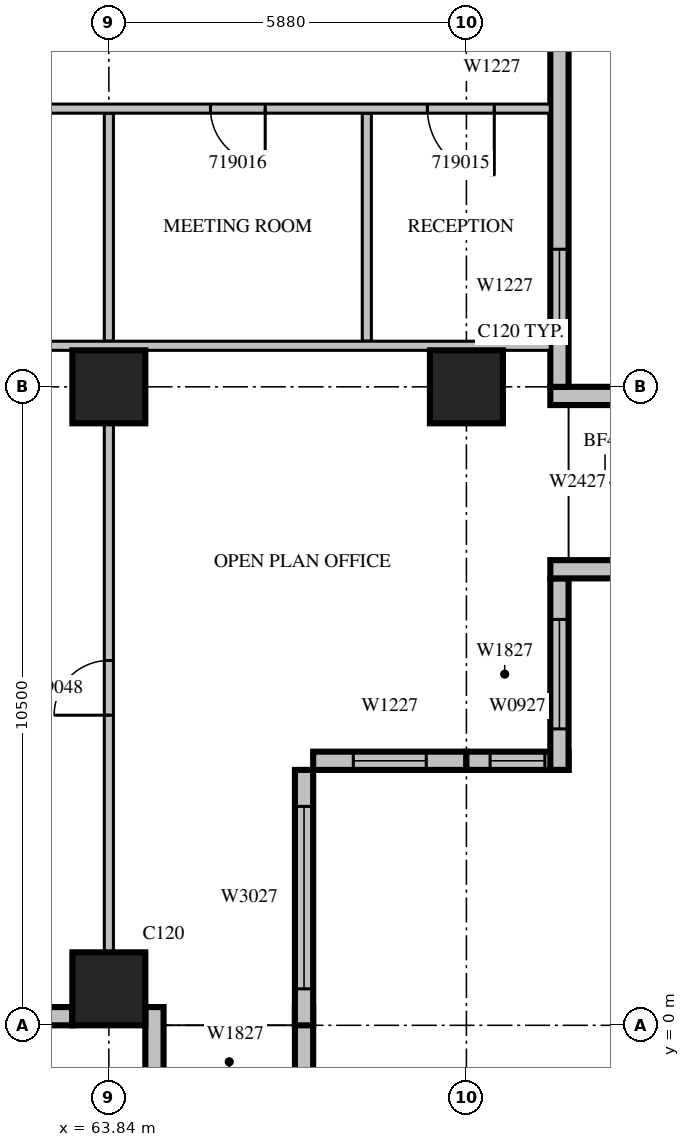
"""IFC4 building model, lengths in metres.
Left out: names, types, materials, properties, quantities, classifications, styles, units other than length and angle.
Written with IfcOpenShell. Run it as: python <this file> out.ifc"""

import sys

from ifc_helpers import new_model, si_unit, direction, frame, frame_2d, origin, origin_2d, place, context, subcontext, project, spatial, rectangle, extrude, source, transform, mapped, element, fill, save


model = new_model("IFC4")
c1 = context("Model", 3, precision=1e-05, world=origin(), true_north=direction((0.0, 1.0)))
c2 = subcontext(c1, "Body", "Model", "MODEL_VIEW")
j1 = project(units=[si_unit("LENGTHUNIT", "METRE"), si_unit("PLANEANGLEUNIT", "RADIAN")], contexts=[c1])
p1 = place(None, origin())
s1 = spatial("IfcSite", under=j1, at=p1, CompositionType="ELEMENT")
p2 = place(p1, origin())
s2 = spatial("IfcBuilding", under=s1, at=p2, CompositionType="ELEMENT")
p3 = place(p2, frame((0.0, 0.0, 90.9)))
s3 = spatial("IfcBuildingStorey", under=s2, at=p3, CompositionType="ELEMENT", Elevation=90.9)
m1 = source(origin(), c2, "Body", "SweptSolid", [
    extrude(rectangle(XDim=1.2, YDim=1.2, at=origin_2d()), origin(), (0.0, 0.0, 1.0), 4.2),
])
for number, where, z_axis, x_axis in (
    (1, (63.84, 0.6, 0.0), (0.0, 0.0, 1.0), (1.0, 0.0, 0.0)),
    (2, (63.84, 10.5, 0.0), (0.0, 0.0, 1.0), (1.0, 0.0, 0.0)),
    (3, (69.72, 10.5, 0.0), (0.0, 0.0, 1.0), (1.0, 0.0, 0.0)),
):
    element("IfcColumn", number, at=place(p3, frame(where, z_axis=z_axis, x_axis=x_axis)), inside=s3, PredefinedType="COLUMN", context=c2, shape_type="MappedRepresentation", body=[
        mapped(m1, transform((0.0, 0.0, 0.0), scale=1.0)),
    ])
m2 = source(origin(), c2, "Body", "SweptSolid", [
    extrude(rectangle(XDim=4.68, YDim=0.3, at=frame_2d((2.34, 0.0))), origin(), (0.0, 0.0, 1.0), 3.8),
])
p4 = place(p3, frame((58.56, 0.15, 0.0), z_axis=(0.0, 0.0, 1.0), x_axis=(1.0, 0.0, 0.0)))
e4 = element("IfcWall", 4, at=p4, inside=s3, PredefinedType="STANDARD", context=c2, shape_type="MappedRepresentation", body=[
    mapped(m2, transform((0.0, 0.0, 0.0), scale=1.0)),
])
m3 = source(origin(), c2, "Body", "SweptSolid", [
    extrude(rectangle(XDim=1.8, YDim=2.7, at=frame_2d((0.9, 1.35))), frame((0.0, 0.16, 0.0), z_axis=(0.0, -1.0, 0.0), x_axis=(1.0, 0.0, 0.0)), (0.0, 0.0, 1.0), 0.32),
])
p5 = place(p4, frame((0.877, 0.0, 0.6)))
e5 = element("IfcOpeningElement", 5, at=p5, cuts=e4, PredefinedType="OPENING", context=c2, shape_type="MappedRepresentation", body=[
    mapped(m3, transform((0.0, 0.0, 0.0), scale=1.0)),
])
m4 = source(origin(), c2, "Body", "SweptSolid", [
    extrude(rectangle(XDim=1.2, YDim=0.3, at=frame_2d((0.6, 0.0))), origin(), (0.0, 0.0, 1.0), 3.8),
])
for number, where, z_axis, x_axis in (
    (6, (64.59, 0.3, 0.0), (0.0, 0.0, 1.0), (0.0, -1.0, 0.0)),
    (7, (67.05, 0.3, 0.0), (0.0, 0.0, 1.0), (0.0, -1.0, 0.0)),
):
    element("IfcWall", number, at=place(p3, frame(where, z_axis=z_axis, x_axis=x_axis)), inside=s3, PredefinedType="STANDARD", context=c2, shape_type="MappedRepresentation", body=[
        mapped(m4, transform((0.0, 0.0, 0.0), scale=1.0)),
    ])
m5 = source(origin(), c2, "Body", "SweptSolid", [
    extrude(rectangle(XDim=4.2, YDim=0.3, at=frame_2d((2.1, 0.0))), origin(), (0.0, 0.0, 1.0), 3.8),
])
p6 = place(p3, frame((67.05, 0.0, 0.0), z_axis=(0.0, 0.0, 1.0), x_axis=(0.0, 1.0, 0.0)))
e8 = element("IfcWall", 8, at=p6, inside=s3, PredefinedType="STANDARD", context=c2, shape_type="MappedRepresentation", body=[
    mapped(m5, transform((0.0, 0.0, 0.0), scale=1.0)),
])
m6 = source(origin(), c2, "Body", "SweptSolid", [
    extrude(rectangle(XDim=3.0, YDim=2.7, at=frame_2d((1.5, 1.35))), frame((0.0, 0.16, 0.0), z_axis=(0.0, -1.0, 0.0), x_axis=(1.0, 0.0, 0.0)), (0.0, 0.0, 1.0), 0.32),
])
p7 = place(p6, frame((0.6, 0.0, 0.6)))
e9 = element("IfcOpeningElement", 9, at=p7, cuts=e8, PredefinedType="OPENING", context=c2, shape_type="MappedRepresentation", body=[
    mapped(m6, transform((0.0, 0.0, 0.0), scale=1.0)),
])
m7 = source(origin(), c2, "Body", "SweptSolid", [
    extrude(rectangle(XDim=2.52, YDim=0.3, at=frame_2d((1.26, 0.0))), origin(), (0.0, 0.0, 1.0), 3.8),
])
p8 = place(p3, frame((67.2, 4.35, 0.0), z_axis=(0.0, 0.0, 1.0), x_axis=(1.0, 0.0, 0.0)))
e10 = element("IfcWall", 10, at=p8, inside=s3, PredefinedType="STANDARD", context=c2, shape_type="MappedRepresentation", body=[
    mapped(m7, transform((0.0, 0.0, 0.0), scale=1.0)),
])
m8 = source(origin(), c2, "Body", "SweptSolid", [
    extrude(rectangle(XDim=1.2, YDim=2.7, at=frame_2d((0.6, 1.35))), frame((0.0, 0.16, 0.0), z_axis=(0.0, -1.0, 0.0), x_axis=(1.0, 0.0, 0.0)), (0.0, 0.0, 1.0), 0.32),
])
p9 = place(p8, frame((0.66, 0.0, 0.6)))
e11 = element("IfcOpeningElement", 11, at=p9, cuts=e10, PredefinedType="OPENING", context=c2, shape_type="MappedRepresentation", body=[
    mapped(m8, transform((0.0, 0.0, 0.0), scale=1.0)),
])
m9 = source(origin(), c2, "Body", "SweptSolid", [
    extrude(rectangle(XDim=1.68, YDim=0.3, at=frame_2d((0.84, 0.0))), origin(), (0.0, 0.0, 1.0), 3.8),
])
p10 = place(p3, frame((69.72, 4.35, 0.0), z_axis=(0.0, 0.0, 1.0), x_axis=(1.0, 0.0, 0.0)))
e12 = element("IfcWall", 12, at=p10, inside=s3, PredefinedType="STANDARD", context=c2, shape_type="MappedRepresentation", body=[
    mapped(m9, transform((0.0, 0.0, 0.0), scale=1.0)),
])
m10 = source(origin(), c2, "Body", "SweptSolid", [
    extrude(rectangle(XDim=0.9, YDim=2.7, at=frame_2d((0.45, 1.35))), frame((0.0, 0.16, 0.0), z_axis=(0.0, -1.0, 0.0), x_axis=(1.0, 0.0, 0.0)), (0.0, 0.0, 1.0), 0.32),
])
p11 = place(p10, frame((0.39, 0.0, 0.6)))
e13 = element("IfcOpeningElement", 13, at=p11, cuts=e12, PredefinedType="OPENING", context=c2, shape_type="MappedRepresentation", body=[
    mapped(m10, transform((0.0, 0.0, 0.0), scale=1.0)),
])
m11 = source(origin(), c2, "Body", "SweptSolid", [
    extrude(rectangle(XDim=3.15, YDim=0.3, at=frame_2d((1.575, 0.0))), origin(), (0.0, 0.0, 1.0), 3.8),
])
p12 = place(p3, frame((71.25, 4.2, 0.0), z_axis=(0.0, 0.0, 1.0), x_axis=(0.0, 1.0, 0.0)))
e14 = element("IfcWall", 14, at=p12, inside=s3, PredefinedType="STANDARD", context=c2, shape_type="MappedRepresentation", body=[
    mapped(m11, transform((0.0, 0.0, 0.0), scale=1.0)),
])
p13 = place(p12, frame((0.675, 0.0, 0.6)))
e15 = element("IfcOpeningElement", 15, at=p13, cuts=e14, PredefinedType="OPENING", context=c2, shape_type="MappedRepresentation", body=[
    mapped(m3, transform((0.0, 0.0, 0.0), scale=1.0)),
])
for number, where, z_axis, x_axis in (
    (16, (71.1, 7.5, 0.0), (0.0, 0.0, 1.0), (1.0, 0.0, 0.0)),
    (17, (71.1, 10.35, 0.0), (0.0, 0.0, 1.0), (1.0, 0.0, 0.0)),
):
    element("IfcWall", number, at=place(p3, frame(where, z_axis=z_axis, x_axis=x_axis)), inside=s3, PredefinedType="STANDARD", context=c2, shape_type="MappedRepresentation", body=[
        mapped(m4, transform((0.0, 0.0, 0.0), scale=1.0)),
    ])
m12 = source(origin(), c2, "Body", "SweptSolid", [
    extrude(rectangle(XDim=6.3, YDim=0.3, at=frame_2d((3.15, 0.0))), origin(), (0.0, 0.0, 1.0), 3.8),
])
p14 = place(p3, frame((71.25, 10.5, 0.0), z_axis=(0.0, 0.0, 1.0), x_axis=(0.0, 1.0, 0.0)))
e18 = element("IfcWall", 18, at=p14, inside=s3, PredefinedType="STANDARD", context=c2, shape_type="MappedRepresentation", body=[
    mapped(m12, transform((0.0, 0.0, 0.0), scale=1.0)),
])
p15 = place(p14, frame((1.062, 0.0, 0.6)))
e19 = element("IfcOpeningElement", 19, at=p15, cuts=e18, PredefinedType="OPENING", context=c2, shape_type="MappedRepresentation", body=[
    mapped(m8, transform((0.0, 0.0, 0.0), scale=1.0)),
])
m13 = source(origin(), c2, "Body", "SweptSolid", [
    extrude(rectangle(XDim=3.75, YDim=0.15, at=frame_2d((1.875, 0.0))), origin(), (0.0, 0.0, 1.0), 3.8),
])
p16 = place(p3, frame((68.082, 11.25, 0.0), z_axis=(0.0, 0.0, 1.0), x_axis=(0.0, 1.0, 0.0)))
e20 = element("IfcWall", 20, at=p16, inside=s3, PredefinedType="PARTITIONING", context=c2, shape_type="MappedRepresentation", body=[
    mapped(m13, transform((0.0, 0.0, 0.0), scale=1.0)),
])
m14 = source(origin(), c2, "Body", "SweptSolid", [
    extrude(rectangle(XDim=8.702, YDim=0.15, at=frame_2d((4.351, 0.0))), origin(), (0.0, 0.0, 1.0), 3.8),
])
p17 = place(p3, frame((63.84, 1.199, 0.0), z_axis=(0.0, 0.0, 1.0), x_axis=(0.0, 1.0, 0.0)))
e21 = element("IfcWall", 21, at=p17, inside=s3, PredefinedType="PARTITIONING", context=c2, shape_type="MappedRepresentation", body=[
    mapped(m14, transform((0.0, 0.0, 0.0), scale=1.0)),
])
m15 = source(origin(), c2, "Body", "SweptSolid", [
    extrude(rectangle(XDim=0.9, YDim=2.1, at=frame_2d((0.45, 1.05))), frame((0.0, 0.085, 0.0), z_axis=(0.0, -1.0, 0.0), x_axis=(1.0, 0.0, 0.0)), (0.0, 0.0, 1.0), 0.17),
])
p18 = place(p17, frame((3.901, 0.0, 0.0)))
e22 = element("IfcOpeningElement", 22, at=p18, cuts=e21, PredefinedType="OPENING", context=c2, shape_type="MappedRepresentation", body=[
    mapped(m15, transform((0.0, 0.0, 0.0), scale=1.0)),
])
p19 = place(p3, frame((63.84, 11.25, 0.0), z_axis=(0.0, 0.0, 1.0), x_axis=(0.0, 1.0, 0.0)))
e23 = element("IfcWall", 23, at=p19, inside=s3, PredefinedType="PARTITIONING", context=c2, shape_type="MappedRepresentation", body=[
    mapped(m13, transform((0.0, 0.0, 0.0), scale=1.0)),
])
m16 = source(origin(), c2, "Body", "SweptSolid", [
    extrude(rectangle(XDim=24.9, YDim=0.15, at=frame_2d((12.45, 0.0))), origin(), (0.0, 0.0, 1.0), 3.8),
])
p20 = place(p3, frame((71.1, 11.175, 0.0), z_axis=(0.0, 0.0, 1.0), x_axis=(-1.0, 0.0, 0.0)))
e24 = element("IfcWall", 24, at=p20, inside=s3, PredefinedType="PARTITIONING", context=c2, shape_type="MappedRepresentation", body=[
    mapped(m16, transform((0.0, 0.0, 0.0), scale=1.0)),
])
p21 = place(p20, frame((21.512, 0.0, 0.0)))
e25 = element("IfcOpeningElement", 25, at=p21, cuts=e24, PredefinedType="OPENING", context=c2, shape_type="MappedRepresentation", body=[
    mapped(m15, transform((0.0, 0.0, 0.0), scale=1.0)),
])
p22 = place(p20, frame((15.633, 0.0, 0.0)))
e26 = element("IfcOpeningElement", 26, at=p22, cuts=e24, PredefinedType="OPENING", context=c2, shape_type="MappedRepresentation", body=[
    mapped(m15, transform((0.0, 0.0, 0.0), scale=1.0)),
])
p23 = place(p20, frame((9.752, 0.0, 0.0)))
e27 = element("IfcOpeningElement", 27, at=p23, cuts=e24, PredefinedType="OPENING", context=c2, shape_type="MappedRepresentation", body=[
    mapped(m15, transform((0.0, 0.0, 0.0), scale=1.0)),
])
p24 = place(p3, frame((71.1, 15.075, 0.0), z_axis=(0.0, 0.0, 1.0), x_axis=(-1.0, 0.0, 0.0)))
e28 = element("IfcWall", 28, at=p24, inside=s3, PredefinedType="PARTITIONING", context=c2, shape_type="MappedRepresentation", body=[
    mapped(m16, transform((0.0, 0.0, 0.0), scale=1.0)),
])
m17 = source(origin(), c2, "Body", "SweptSolid", [
    extrude(rectangle(XDim=1.2, YDim=2.1, at=frame_2d((0.6, 1.05))), frame((0.0, 0.085, 0.0), z_axis=(0.0, -1.0, 0.0), x_axis=(1.0, 0.0, 0.0)), (0.0, 0.0, 1.0), 0.17),
])
p25 = place(p24, frame((15.48, 0.0, 0.0)))
e29 = element("IfcOpeningElement", 29, at=p25, cuts=e28, PredefinedType="OPENING", context=c2, shape_type="MappedRepresentation", body=[
    mapped(m17, transform((0.0, 0.0, 0.0), scale=1.0)),
])
m18 = source(origin(), c2, "Body", "SweptSolid", [
    extrude(rectangle(XDim=1.1, YDim=2.1, at=frame_2d((0.55, 1.05))), frame((0.0, 0.085, 0.0), z_axis=(0.0, -1.0, 0.0), x_axis=(1.0, 0.0, 0.0)), (0.0, 0.0, 1.0), 0.17),
])
p26 = place(p24, frame((0.921, 0.0, 0.0)))
e30 = element("IfcOpeningElement", 30, at=p26, cuts=e28, PredefinedType="OPENING", context=c2, shape_type="MappedRepresentation", body=[
    mapped(m18, transform((0.0, 0.0, 0.0), scale=1.0)),
])
p27 = place(p24, frame((4.689, 0.0, 0.0)))
e31 = element("IfcOpeningElement", 31, at=p27, cuts=e28, PredefinedType="OPENING", context=c2, shape_type="MappedRepresentation", body=[
    mapped(m15, transform((0.0, 0.0, 0.0), scale=1.0)),
])
m19 = source(origin(), c2, "Body", "SweptSolid", [
    extrude(rectangle(XDim=3.0, YDim=2.7, at=frame_2d((1.5, 1.35))), frame((0.0, 0.03, 0.0), z_axis=(0.0, -1.0, 0.0), x_axis=(1.0, 0.0, 0.0)), (0.0, 0.0, 1.0), 0.06),
])
p28 = place(p7, origin())
e32 = element("IfcWindow", 32, at=p28, inside=s3, PartitioningType="SINGLE_PANEL", PredefinedType="WINDOW", context=c2, shape_type="MappedRepresentation", body=[
    mapped(m19, transform((0.0, 0.0, 0.0), scale=1.0)),
])
fill(e9, e32)
m20 = source(origin(), c2, "Body", "SweptSolid", [
    extrude(rectangle(XDim=1.2, YDim=2.7, at=frame_2d((0.6, 1.35))), frame((0.0, 0.03, 0.0), z_axis=(0.0, -1.0, 0.0), x_axis=(1.0, 0.0, 0.0)), (0.0, 0.0, 1.0), 0.06),
])
p29 = place(p9, origin())
e33 = element("IfcWindow", 33, at=p29, inside=s3, PartitioningType="SINGLE_PANEL", PredefinedType="WINDOW", context=c2, shape_type="MappedRepresentation", body=[
    mapped(m20, transform((0.0, 0.0, 0.0), scale=1.0)),
])
fill(e11, e33)
m21 = source(origin(), c2, "Body", "SweptSolid", [
    extrude(rectangle(XDim=0.9, YDim=2.7, at=frame_2d((0.45, 1.35))), frame((0.0, 0.03, 0.0), z_axis=(0.0, -1.0, 0.0), x_axis=(1.0, 0.0, 0.0)), (0.0, 0.0, 1.0), 0.06),
])
p30 = place(p11, origin())
e34 = element("IfcWindow", 34, at=p30, inside=s3, PartitioningType="SINGLE_PANEL", PredefinedType="WINDOW", context=c2, shape_type="MappedRepresentation", body=[
    mapped(m21, transform((0.0, 0.0, 0.0), scale=1.0)),
])
fill(e13, e34)
m22 = source(origin(), c2, "Body", "SweptSolid", [
    extrude(rectangle(XDim=1.8, YDim=2.7, at=frame_2d((0.9, 1.35))), frame((0.0, 0.03, 0.0), z_axis=(0.0, -1.0, 0.0), x_axis=(1.0, 0.0, 0.0)), (0.0, 0.0, 1.0), 0.06),
])
p31 = place(p13, origin())
e35 = element("IfcWindow", 35, at=p31, inside=s3, PartitioningType="SINGLE_PANEL", PredefinedType="WINDOW", context=c2, shape_type="MappedRepresentation", body=[
    mapped(m22, transform((0.0, 0.0, 0.0), scale=1.0)),
])
fill(e15, e35)
p32 = place(p15, origin())
e36 = element("IfcWindow", 36, at=p32, inside=s3, PartitioningType="SINGLE_PANEL", PredefinedType="WINDOW", context=c2, shape_type="MappedRepresentation", body=[
    mapped(m20, transform((0.0, 0.0, 0.0), scale=1.0)),
])
fill(e19, e36)
m23 = source(origin(), c2, "Body", "SweptSolid", [
    extrude(rectangle(XDim=1.1, YDim=2.1, at=frame_2d((0.55, 1.05))), frame((0.0, 0.025, 0.0), z_axis=(0.0, -1.0, 0.0), x_axis=(1.0, 0.0, 0.0)), (0.0, 0.0, 1.0), 0.05),
])
p33 = place(p26, origin())
e37 = element("IfcDoor", 37, at=p33, inside=s3, OperationType="SINGLE_SWING_LEFT", PredefinedType="DOOR", context=c2, shape_type="MappedRepresentation", body=[
    mapped(m23, transform((0.0, 0.0, 0.0), scale=1.0)),
])
fill(e30, e37)
m24 = source(origin(), c2, "Body", "SweptSolid", [
    extrude(rectangle(XDim=0.9, YDim=2.1, at=frame_2d((0.45, 1.05))), frame((0.0, 0.025, 0.0), z_axis=(0.0, -1.0, 0.0), x_axis=(1.0, 0.0, 0.0)), (0.0, 0.0, 1.0), 0.05),
])
p34 = place(p27, origin())
e38 = element("IfcDoor", 38, at=p34, inside=s3, OperationType="SINGLE_SWING_LEFT", PredefinedType="DOOR", context=c2, shape_type="MappedRepresentation", body=[
    mapped(m24, transform((0.0, 0.0, 0.0), scale=1.0)),
])
fill(e31, e38)
p35 = place(p18, origin())
e39 = element("IfcDoor", 39, at=p35, inside=s3, OperationType="SINGLE_SWING_LEFT", PredefinedType="DOOR", context=c2, shape_type="MappedRepresentation", body=[
    mapped(m24, transform((0.0, 0.0, 0.0), scale=1.0)),
])
fill(e22, e39)
save(model, sys.argv[1])
